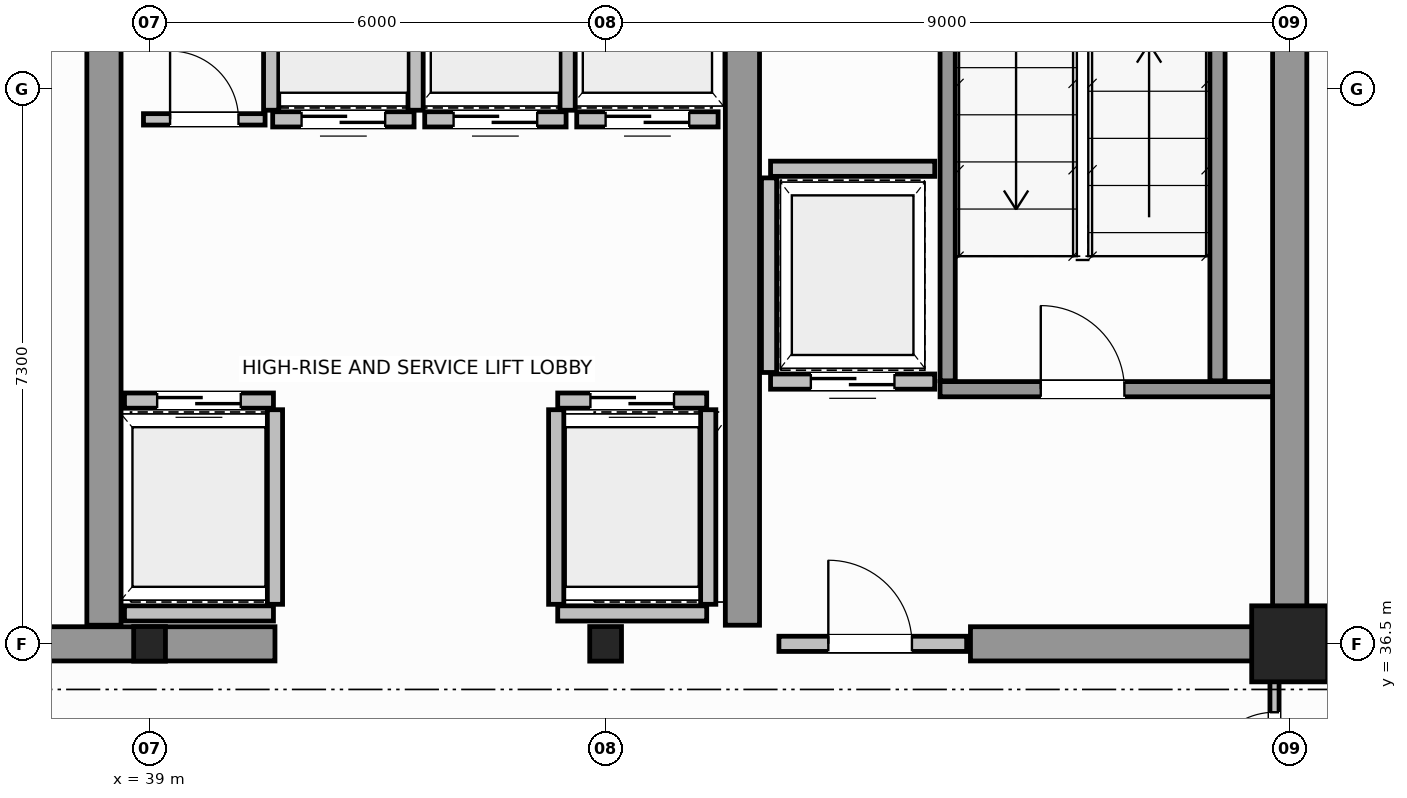
"""IFC4 building model, lengths in metres.
Left out: names, types, materials, properties, quantities, classifications, styles, units other than length and angle.
Written with IfcOpenShell. Run it as: python <this file> out.ifc"""

import sys

from ifc_helpers import new_model, si_unit, direction, frame, frame_2d, origin, origin_2d, place, context, subcontext, project, spatial, rectangle, i_section, extrude, source, transform, mapped, element, fill, save


model = new_model("IFC4")
c1 = context("Model", 3, precision=1e-05, world=origin(), true_north=direction((0.0, 1.0)))
c2 = subcontext(c1, "Body", "Model", "MODEL_VIEW")
j1 = project(units=[si_unit("LENGTHUNIT", "METRE"), si_unit("PLANEANGLEUNIT", "RADIAN")], contexts=[c1])
p1 = place(None, origin())
s1 = spatial("IfcSite", under=j1, at=p1, CompositionType="ELEMENT")
p2 = place(p1, origin())
s2 = spatial("IfcBuilding", under=s1, at=p2, CompositionType="ELEMENT")
p3 = place(p2, frame((0.0, 0.0, 246.0)))
s3 = spatial("IfcBuildingStorey", under=s2, at=p3, CompositionType="ELEMENT", Elevation=246.0)
m1 = source(origin(), c2, "Body", "SweptSolid", [
    extrude(i_section(OverallWidth=0.418, OverallDepth=0.455, WebThickness=0.042, FlangeThickness=0.058, FilletRadius=0.015, at=origin_2d()), origin(), (0.0, 0.0, 1.0), 3.8),
])
for number, where, z_axis, x_axis in (
    (1, (39.0, 36.5, 0.0), (0.0, 0.0, 1.0), (1.0, 0.0, 0.0)),
    (2, (45.0, 36.5, 0.0), (0.0, 0.0, 1.0), (1.0, 0.0, 0.0)),
):
    element("IfcColumn", number, at=place(p3, frame(where, z_axis=z_axis, x_axis=x_axis)), inside=s3, PredefinedType="COLUMN", context=c2, shape_type="MappedRepresentation", body=[
        mapped(m1, transform((0.0, 0.0, 0.0), scale=1.0)),
    ])
m2 = source(origin(), c2, "Body", "SweptSolid", [
    extrude(rectangle(XDim=1.0, YDim=1.0, at=origin_2d()), origin(), (0.0, 0.0, 1.0), 3.8),
])
p4 = place(p3, frame((54.0, 36.5, 0.0), z_axis=(0.0, 0.0, 1.0), x_axis=(1.0, 0.0, 0.0)))
e3 = element("IfcColumn", 3, at=p4, inside=s3, PredefinedType="COLUMN", context=c2, shape_type="MappedRepresentation", body=[
    mapped(m2, transform((0.0, 0.0, 0.0), scale=1.0)),
])
p5 = place(p3, frame((54.0, 36.5, 0.0), z_axis=(0.0, 0.0, 1.0), x_axis=(0.0, 1.0, 0.0)))
e4 = element("IfcWall", 4, at=p5, inside=s3, PredefinedType="SHEAR", context=c2, shape_type="SweptSolid", body=[
    extrude(rectangle(XDim=14.5, YDim=0.45, at=frame_2d((7.25, 0.0))), origin(), (0.0, 0.0, 1.0), 3.8),
])
p6 = place(p3, frame((36.15, 36.5, 0.0), z_axis=(0.0, 0.0, 1.0), x_axis=(1.0, 0.0, 0.0)))
e5 = element("IfcWall", 5, at=p6, inside=s3, PredefinedType="SHEAR", context=c2, shape_type="SweptSolid", body=[
    extrude(rectangle(XDim=4.5, YDim=0.45, at=frame_2d((2.25, 0.0))), origin(), (0.0, 0.0, 1.0), 3.8),
])
p7 = place(p3, frame((49.8, 36.5, 0.0), z_axis=(0.0, 0.0, 1.0), x_axis=(1.0, 0.0, 0.0)))
e6 = element("IfcWall", 6, at=p7, inside=s3, PredefinedType="SHEAR", context=c2, shape_type="SweptSolid", body=[
    extrude(rectangle(XDim=3.955, YDim=0.45, at=frame_2d((1.978, 0.0))), origin(), (0.0, 0.0, 1.0), 2.58),
])
for number, where, z_axis, x_axis in (
    (7, (38.4, 36.745, 0.0), (0.0, 0.0, 1.0), (0.0, 1.0, 0.0)),
    (8, (46.8, 36.745, 0.0), (0.0, 0.0, 1.0), (0.0, 1.0, 0.0)),
):
    element("IfcWall", number, at=place(p3, frame(where, z_axis=z_axis, x_axis=x_axis)), inside=s3, PredefinedType="SHEAR", context=c2, shape_type="SweptSolid", body=[
        extrude(rectangle(XDim=9.455, YDim=0.45, at=frame_2d((4.728, 0.0))), origin(), (0.0, 0.0, 1.0), 3.8),
    ])
p8 = place(p3, frame((49.4, 39.85, 0.0), z_axis=(0.0, 0.0, 1.0), x_axis=(1.0, 0.0, 0.0)))
e9 = element("IfcWall", 9, at=p8, inside=s3, PredefinedType="SOLIDWALL", context=c2, shape_type="SweptSolid", body=[
    extrude(rectangle(XDim=4.375, YDim=0.2, at=frame_2d((2.188, 0.0))), origin(), (0.0, 0.0, 1.0), 3.8),
])
p9 = place(p8, frame((1.325, 0.0, 0.0)))
e10 = element("IfcOpeningElement", 10, at=p9, cuts=e9, PredefinedType="OPENING", context=c2, shape_type="SweptSolid", body=[
    extrude(rectangle(XDim=1.1, YDim=2.15, at=frame_2d((0.55, 1.075))), frame((0.0, 0.11, 0.0), z_axis=(0.0, -1.0, 0.0), x_axis=(1.0, 0.0, 0.0)), (0.0, 0.0, 1.0), 0.22),
])
for number, where, z_axis, x_axis in (
    (11, (49.5, 39.96, 0.0), (0.0, 0.0, 1.0), (0.0, 1.0, 0.0)),
    (12, (53.05, 39.96, 0.0), (0.0, 0.0, 1.0), (0.0, 1.0, 0.0)),
):
    element("IfcWall", number, at=place(p3, frame(where, z_axis=z_axis, x_axis=x_axis)), inside=s3, PredefinedType="SOLIDWALL", context=c2, shape_type="SweptSolid", body=[
        extrude(rectangle(XDim=9.93, YDim=0.2, at=frame_2d((4.965, 0.0))), origin(), (0.0, 0.0, 1.0), 3.8),
    ])
p10 = place(p3, frame((47.28, 36.5, 0.0), z_axis=(0.0, 0.0, 1.0), x_axis=(1.0, 0.0, 0.0)))
e13 = element("IfcWall", 13, at=p10, inside=s3, PredefinedType="SOLIDWALL", context=c2, shape_type="SweptSolid", body=[
    extrude(rectangle(XDim=2.47, YDim=0.2, at=frame_2d((1.235, 0.0))), origin(), (0.0, 0.0, 1.0), 2.57),
])
p11 = place(p10, frame((0.65, 0.0, 0.0)))
e14 = element("IfcOpeningElement", 14, at=p11, cuts=e13, PredefinedType="OPENING", context=c2, shape_type="SweptSolid", body=[
    extrude(rectangle(XDim=1.1, YDim=2.15, at=frame_2d((0.55, 1.075))), frame((0.0, 0.11, 0.0), z_axis=(0.0, -1.0, 0.0), x_axis=(1.0, 0.0, 0.0)), (0.0, 0.0, 1.0), 0.22),
])
p12 = place(p3, frame((38.67, 39.7, 0.0), z_axis=(0.0, 0.0, 1.0), x_axis=(1.0, 0.0, 0.0)))
e15 = element("IfcWall", 15, at=p12, inside=s3, PredefinedType="SOLIDWALL", context=c2, shape_type="SweptSolid", body=[
    extrude(rectangle(XDim=1.96, YDim=0.2, at=frame_2d((0.98, 0.0))), origin(), (0.0, 0.0, 1.0), 3.58),
])
p13 = place(p12, frame((0.43, 0.0, 0.0)))
e16 = element("IfcOpeningElement", 16, at=p13, cuts=e15, PredefinedType="OPENING", context=c2, shape_type="SweptSolid", body=[
    extrude(rectangle(XDim=1.1, YDim=2.15, at=frame_2d((0.55, 1.075))), frame((0.0, 0.11, 0.0), z_axis=(0.0, -1.0, 0.0), x_axis=(1.0, 0.0, 0.0)), (0.0, 0.0, 1.0), 0.22),
])
p14 = place(p3, frame((38.67, 36.9, 0.0), z_axis=(0.0, 0.0, 1.0), x_axis=(1.0, 0.0, 0.0)))
e17 = element("IfcWall", 17, at=p14, inside=s3, PredefinedType="SOLIDWALL", context=c2, shape_type="SweptSolid", body=[
    extrude(rectangle(XDim=1.96, YDim=0.2, at=frame_2d((0.98, 0.0))), origin(), (0.0, 0.0, 1.0), 3.58),
])
p15 = place(p3, frame((40.65, 37.02, 0.0), z_axis=(0.0, 0.0, 1.0), x_axis=(0.0, 1.0, 0.0)))
e18 = element("IfcWall", 18, at=p15, inside=s3, PredefinedType="SOLIDWALL", context=c2, shape_type="SweptSolid", body=[
    extrude(rectangle(XDim=2.56, YDim=0.2, at=frame_2d((1.28, 0.0))), origin(), (0.0, 0.0, 1.0), 3.58),
])
p16 = place(p3, frame((44.37, 39.7, 0.0), z_axis=(0.0, 0.0, 1.0), x_axis=(1.0, 0.0, 0.0)))
e19 = element("IfcWall", 19, at=p16, inside=s3, PredefinedType="SOLIDWALL", context=c2, shape_type="SweptSolid", body=[
    extrude(rectangle(XDim=1.96, YDim=0.2, at=frame_2d((0.98, 0.0))), origin(), (0.0, 0.0, 1.0), 3.58),
])
p17 = place(p16, frame((0.43, 0.0, 0.0)))
e20 = element("IfcOpeningElement", 20, at=p17, cuts=e19, PredefinedType="OPENING", context=c2, shape_type="SweptSolid", body=[
    extrude(rectangle(XDim=1.1, YDim=2.15, at=frame_2d((0.55, 1.075))), frame((0.0, 0.11, 0.0), z_axis=(0.0, -1.0, 0.0), x_axis=(1.0, 0.0, 0.0)), (0.0, 0.0, 1.0), 0.22),
])
p18 = place(p3, frame((44.37, 36.9, 0.0), z_axis=(0.0, 0.0, 1.0), x_axis=(1.0, 0.0, 0.0)))
e21 = element("IfcWall", 21, at=p18, inside=s3, PredefinedType="SOLIDWALL", context=c2, shape_type="SweptSolid", body=[
    extrude(rectangle(XDim=1.96, YDim=0.2, at=frame_2d((0.98, 0.0))), origin(), (0.0, 0.0, 1.0), 2.57),
])
for number, where, z_axis, x_axis in (
    (22, (44.35, 37.02, 0.0), (0.0, 0.0, 1.0), (0.0, 1.0, 0.0)),
    (23, (46.35, 37.02, 0.0), (0.0, 0.0, 1.0), (0.0, 1.0, 0.0)),
):
    element("IfcWall", number, at=place(p3, frame(where, z_axis=z_axis, x_axis=x_axis)), inside=s3, PredefinedType="SOLIDWALL", context=c2, shape_type="SweptSolid", body=[
        extrude(rectangle(XDim=2.56, YDim=0.2, at=frame_2d((1.28, 0.0))), origin(), (0.0, 0.0, 1.0), 3.58),
    ])
p19 = place(p3, frame((40.62, 43.4, 0.0), z_axis=(0.0, 0.0, 1.0), x_axis=(1.0, 0.0, 0.0)))
e24 = element("IfcWall", 24, at=p19, inside=s3, PredefinedType="SOLIDWALL", context=c2, shape_type="SweptSolid", body=[
    extrude(rectangle(XDim=1.86, YDim=0.2, at=frame_2d((0.93, 0.0))), origin(), (0.0, 0.0, 1.0), 3.58),
])
p20 = place(p19, frame((0.38, 0.0, 0.0)))
e25 = element("IfcOpeningElement", 25, at=p20, cuts=e24, PredefinedType="OPENING", context=c2, shape_type="SweptSolid", body=[
    extrude(rectangle(XDim=1.1, YDim=2.15, at=frame_2d((0.55, 1.075))), frame((0.0, 0.11, 0.0), z_axis=(0.0, -1.0, 0.0), x_axis=(1.0, 0.0, 0.0)), (0.0, 0.0, 1.0), 0.22),
])
for number, where, z_axis, x_axis in (
    (26, (40.6, 43.52, 0.0), (0.0, 0.0, 1.0), (0.0, 1.0, 0.0)),
    (27, (42.5, 43.52, 0.0), (0.0, 0.0, 1.0), (0.0, 1.0, 0.0)),
):
    element("IfcWall", number, at=place(p3, frame(where, z_axis=z_axis, x_axis=x_axis)), inside=s3, PredefinedType="SOLIDWALL", context=c2, shape_type="SweptSolid", body=[
        extrude(rectangle(XDim=2.56, YDim=0.2, at=frame_2d((1.28, 0.0))), origin(), (0.0, 0.0, 1.0), 3.58),
    ])
p21 = place(p3, frame((42.62, 43.4, 0.0), z_axis=(0.0, 0.0, 1.0), x_axis=(1.0, 0.0, 0.0)))
e28 = element("IfcWall", 28, at=p21, inside=s3, PredefinedType="SOLIDWALL", context=c2, shape_type="SweptSolid", body=[
    extrude(rectangle(XDim=1.86, YDim=0.2, at=frame_2d((0.93, 0.0))), origin(), (0.0, 0.0, 1.0), 3.58),
])
p22 = place(p21, frame((0.38, 0.0, 0.0)))
e29 = element("IfcOpeningElement", 29, at=p22, cuts=e28, PredefinedType="OPENING", context=c2, shape_type="SweptSolid", body=[
    extrude(rectangle(XDim=1.1, YDim=2.15, at=frame_2d((0.55, 1.075))), frame((0.0, 0.11, 0.0), z_axis=(0.0, -1.0, 0.0), x_axis=(1.0, 0.0, 0.0)), (0.0, 0.0, 1.0), 0.22),
])
p23 = place(p3, frame((44.5, 43.52, 0.0), z_axis=(0.0, 0.0, 1.0), x_axis=(0.0, 1.0, 0.0)))
e30 = element("IfcWall", 30, at=p23, inside=s3, PredefinedType="SOLIDWALL", context=c2, shape_type="SweptSolid", body=[
    extrude(rectangle(XDim=2.56, YDim=0.2, at=frame_2d((1.28, 0.0))), origin(), (0.0, 0.0, 1.0), 3.58),
])
p24 = place(p3, frame((44.62, 43.4, 0.0), z_axis=(0.0, 0.0, 1.0), x_axis=(1.0, 0.0, 0.0)))
e31 = element("IfcWall", 31, at=p24, inside=s3, PredefinedType="SOLIDWALL", context=c2, shape_type="SweptSolid", body=[
    extrude(rectangle(XDim=1.86, YDim=0.2, at=frame_2d((0.93, 0.0))), origin(), (0.0, 0.0, 1.0), 3.58),
])
p25 = place(p24, frame((0.38, 0.0, 0.0)))
e32 = element("IfcOpeningElement", 32, at=p25, cuts=e31, PredefinedType="OPENING", context=c2, shape_type="SweptSolid", body=[
    extrude(rectangle(XDim=1.1, YDim=2.15, at=frame_2d((0.55, 1.075))), frame((0.0, 0.11, 0.0), z_axis=(0.0, -1.0, 0.0), x_axis=(1.0, 0.0, 0.0)), (0.0, 0.0, 1.0), 0.22),
])
p26 = place(p3, frame((47.17, 39.95, 0.0), z_axis=(0.0, 0.0, 1.0), x_axis=(1.0, 0.0, 0.0)))
e33 = element("IfcWall", 33, at=p26, inside=s3, PredefinedType="SOLIDWALL", context=c2, shape_type="SweptSolid", body=[
    extrude(rectangle(XDim=2.16, YDim=0.2, at=frame_2d((1.08, 0.0))), origin(), (0.0, 0.0, 1.0), 3.58),
])
p27 = place(p26, frame((0.53, 0.0, 0.0)))
e34 = element("IfcOpeningElement", 34, at=p27, cuts=e33, PredefinedType="OPENING", context=c2, shape_type="SweptSolid", body=[
    extrude(rectangle(XDim=1.1, YDim=2.15, at=frame_2d((0.55, 1.075))), frame((0.0, 0.11, 0.0), z_axis=(0.0, -1.0, 0.0), x_axis=(1.0, 0.0, 0.0)), (0.0, 0.0, 1.0), 0.22),
])
p28 = place(p3, frame((47.17, 42.75, 0.0), z_axis=(0.0, 0.0, 1.0), x_axis=(1.0, 0.0, 0.0)))
e35 = element("IfcWall", 35, at=p28, inside=s3, PredefinedType="SOLIDWALL", context=c2, shape_type="SweptSolid", body=[
    extrude(rectangle(XDim=2.16, YDim=0.2, at=frame_2d((1.08, 0.0))), origin(), (0.0, 0.0, 1.0), 3.58),
])
p29 = place(p3, frame((47.15, 40.07, 0.0), z_axis=(0.0, 0.0, 1.0), x_axis=(0.0, 1.0, 0.0)))
e36 = element("IfcWall", 36, at=p29, inside=s3, PredefinedType="SOLIDWALL", context=c2, shape_type="SweptSolid", body=[
    extrude(rectangle(XDim=2.56, YDim=0.2, at=frame_2d((1.28, 0.0))), origin(), (0.0, 0.0, 1.0), 3.58),
])
p30 = place(p3, frame((38.92, 43.4, 0.0), z_axis=(0.0, 0.0, 1.0), x_axis=(1.0, 0.0, 0.0)))
e37 = element("IfcWall", 37, at=p30, inside=s3, PredefinedType="PARTITIONING", context=c2, shape_type="SweptSolid", body=[
    extrude(rectangle(XDim=1.6, YDim=0.15, at=frame_2d((0.8, 0.0))), origin(), (0.0, 0.0, 1.0), 3.58),
])
p31 = place(p30, frame((0.35, 0.0, 0.0)))
e38 = element("IfcOpeningElement", 38, at=p31, cuts=e37, PredefinedType="OPENING", context=c2, shape_type="SweptSolid", body=[
    extrude(rectangle(XDim=0.9, YDim=2.1, at=frame_2d((0.45, 1.05))), frame((0.0, 0.085, 0.0), z_axis=(0.0, -1.0, 0.0), x_axis=(1.0, 0.0, 0.0)), (0.0, 0.0, 1.0), 0.17),
])
p32 = place(p3, frame((53.8, 34.0, 0.0), z_axis=(0.0, 0.0, 1.0), x_axis=(0.0, 1.0, 0.0)))
e39 = element("IfcWall", 39, at=p32, inside=s3, PredefinedType="PARTITIONING", context=c2, shape_type="SweptSolid", body=[
    extrude(rectangle(XDim=2.44, YDim=0.12, at=frame_2d((1.22, 0.0))), origin(), (0.0, 0.0, 1.0), 3.58),
])
p33 = place(p32, frame((0.7, 0.0, 0.0)))
e40 = element("IfcOpeningElement", 40, at=p33, cuts=e39, PredefinedType="OPENING", context=c2, shape_type="SweptSolid", body=[
    extrude(rectangle(XDim=0.9, YDim=2.15, at=frame_2d((0.45, 1.075))), frame((0.0, 0.07, 0.0), z_axis=(0.0, -1.0, 0.0), x_axis=(1.0, 0.0, 0.0)), (0.0, 0.0, 1.0), 0.14),
])
m3 = source(origin(), c2, "Body", "SweptSolid", [
    extrude(rectangle(XDim=1.1, YDim=2.15, at=frame_2d((0.55, 1.075))), frame((0.0, 0.025, 0.0), z_axis=(0.0, -1.0, 0.0), x_axis=(1.0, 0.0, 0.0)), (0.0, 0.0, 1.0), 0.05),
])
p34 = place(p9, origin())
e41 = element("IfcDoor", 41, at=p34, inside=s3, OperationType="SINGLE_SWING_RIGHT", PredefinedType="DOOR", context=c2, shape_type="MappedRepresentation", body=[
    mapped(m3, transform((0.0, 0.0, 0.0), scale=1.0)),
])
fill(e10, e41)
p35 = place(p11, origin())
e42 = element("IfcDoor", 42, at=p35, inside=s3, OperationType="SINGLE_SWING_LEFT", PredefinedType="DOOR", context=c2, shape_type="MappedRepresentation", body=[
    mapped(m3, transform((0.0, 0.0, 0.0), scale=1.0)),
])
fill(e14, e42)
p36 = place(p13, origin())
e43 = element("IfcDoor", 43, at=p36, inside=s3, OperationType="DOUBLE_DOOR_SLIDING", PredefinedType="DOOR", context=c2, shape_type="MappedRepresentation", body=[
    mapped(m3, transform((0.0, 0.0, 0.0), scale=1.0)),
])
fill(e16, e43)
p37 = place(p17, origin())
e44 = element("IfcDoor", 44, at=p37, inside=s3, OperationType="DOUBLE_DOOR_SLIDING", PredefinedType="DOOR", context=c2, shape_type="MappedRepresentation", body=[
    mapped(m3, transform((0.0, 0.0, 0.0), scale=1.0)),
])
fill(e20, e44)
p38 = place(p20, origin())
e45 = element("IfcDoor", 45, at=p38, inside=s3, OperationType="DOUBLE_DOOR_SLIDING", PredefinedType="DOOR", context=c2, shape_type="MappedRepresentation", body=[
    mapped(m3, transform((0.0, 0.0, 0.0), scale=1.0)),
])
fill(e25, e45)
p39 = place(p22, origin())
e46 = element("IfcDoor", 46, at=p39, inside=s3, OperationType="DOUBLE_DOOR_SLIDING", PredefinedType="DOOR", context=c2, shape_type="MappedRepresentation", body=[
    mapped(m3, transform((0.0, 0.0, 0.0), scale=1.0)),
])
fill(e29, e46)
p40 = place(p25, origin())
e47 = element("IfcDoor", 47, at=p40, inside=s3, OperationType="DOUBLE_DOOR_SLIDING", PredefinedType="DOOR", context=c2, shape_type="MappedRepresentation", body=[
    mapped(m3, transform((0.0, 0.0, 0.0), scale=1.0)),
])
fill(e32, e47)
p41 = place(p27, origin())
e48 = element("IfcDoor", 48, at=p41, inside=s3, OperationType="DOUBLE_DOOR_SLIDING", PredefinedType="DOOR", context=c2, shape_type="MappedRepresentation", body=[
    mapped(m3, transform((0.0, 0.0, 0.0), scale=1.0)),
])
fill(e34, e48)
m4 = source(origin(), c2, "Body", "SweptSolid", [
    extrude(rectangle(XDim=0.9, YDim=2.1, at=frame_2d((0.45, 1.05))), frame((0.0, 0.025, 0.0), z_axis=(0.0, -1.0, 0.0), x_axis=(1.0, 0.0, 0.0)), (0.0, 0.0, 1.0), 0.05),
])
p42 = place(p31, origin())
e49 = element("IfcDoor", 49, at=p42, inside=s3, OperationType="SINGLE_SWING_LEFT", PredefinedType="DOOR", context=c2, shape_type="MappedRepresentation", body=[
    mapped(m4, transform((0.0, 0.0, 0.0), scale=1.0)),
])
fill(e38, e49)
m5 = source(origin(), c2, "Body", "SweptSolid", [
    extrude(rectangle(XDim=0.9, YDim=2.15, at=frame_2d((0.45, 1.075))), frame((0.0, 0.025, 0.0), z_axis=(0.0, -1.0, 0.0), x_axis=(1.0, 0.0, 0.0)), (0.0, 0.0, 1.0), 0.05),
])
p43 = place(p33, origin())
e50 = element("IfcDoor", 50, at=p43, inside=s3, OperationType="SINGLE_SWING_RIGHT", PredefinedType="DOOR", context=c2, shape_type="MappedRepresentation", body=[
    mapped(m5, transform((0.0, 0.0, 0.0), scale=1.0)),
])
fill(e40, e50)
save(model, sys.argv[1])
